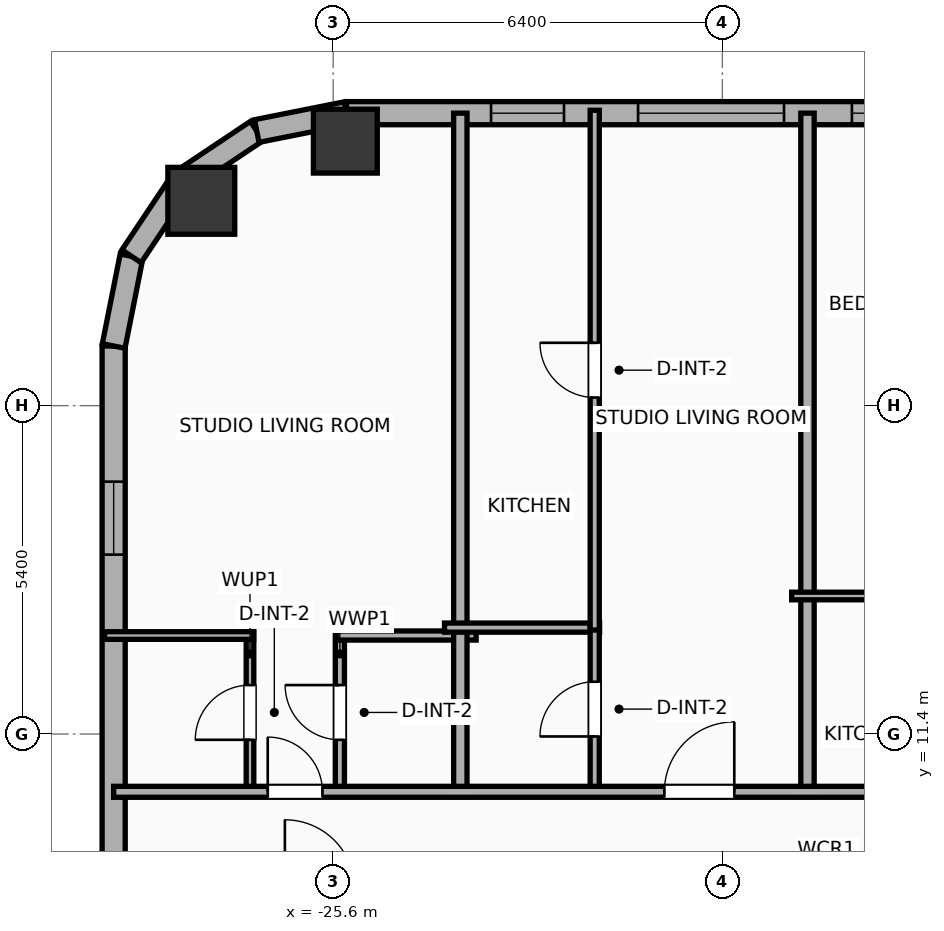
"""IFC4 building model, lengths in metres.
Left out: names, types, materials, properties, quantities, classifications, styles, units other than length and angle.
Written with IfcOpenShell. Run it as: python <this file> out.ifc"""

import sys

from ifc_helpers import new_model, si_unit, direction, frame, frame_2d, origin, origin_2d, place, context, subcontext, project, spatial, rectangle, hollow_rectangle, hollow_circle, extrude, element, fill, save


model = new_model("IFC4")
c1 = context("Model", 3, precision=1e-05, world=origin(), true_north=direction((0.0, 1.0)))
c2 = subcontext(c1, "Body", "Model", "MODEL_VIEW")
j1 = project(units=[si_unit("LENGTHUNIT", "METRE"), si_unit("PLANEANGLEUNIT", "RADIAN")], contexts=[c1])
p1 = place(None, origin())
s1 = spatial("IfcSite", under=j1, at=p1, CompositionType="ELEMENT")
p2 = place(p1, origin())
s2 = spatial("IfcBuilding", under=s1, at=p2, CompositionType="ELEMENT")
p3 = place(p2, frame((0.0, 0.0, 93.6)))
s3 = spatial("IfcBuildingStorey", under=s2, at=p3, CompositionType="ELEMENT", Elevation=93.6)
p4 = place(p3, frame((-25.4, 21.15, 0.0), z_axis=(0.0, 0.0, 1.0), x_axis=(1.0, 0.0, 0.0)))
e1 = element("IfcColumn", 1, at=p4, inside=s3, PredefinedType="COLUMN", context=c2, shape_type="SweptSolid", body=[
    extrude(hollow_rectangle(XDim=1.05, YDim=1.05, WallThickness=0.036, at=origin_2d()), origin(), (0.0, 0.0, 1.0), 3.9),
])
p5 = place(p3, frame((-27.769, 20.169, 0.0), z_axis=(0.0, 0.0, 1.0), x_axis=(1.0, 0.0, 0.0)))
e2 = element("IfcColumn", 2, at=p5, inside=s3, PredefinedType="COLUMN", context=c2, shape_type="SweptSolid", body=[
    extrude(hollow_circle(Radius=0.55, WallThickness=0.036, at=origin_2d()), origin(), (0.0, 0.0, 1.0), 3.9),
])
p6 = place(p3, frame((-29.21, -16.581, 0.0), z_axis=(0.0, 0.0, 1.0), x_axis=(0.0, 1.0, 0.0)))
e3 = element("IfcWall", 3, at=p6, inside=s3, PredefinedType="ELEMENTEDWALL", context=c2, shape_type="SweptSolid", body=[
    extrude(rectangle(XDim=34.363, YDim=0.38, at=frame_2d((17.181, 0.0))), origin(), (0.0, 0.0, 1.0), 3.65),
])
p7 = place(p6, frame((30.932, 0.0, 0.75)))
e4 = element("IfcOpeningElement", 4, at=p7, cuts=e3, PredefinedType="OPENING", context=c2, shape_type="SweptSolid", body=[
    extrude(rectangle(XDim=1.2, YDim=2.05, at=frame_2d((0.6, 1.025))), frame((0.0, 0.2, 0.0), z_axis=(0.0, -1.0, 0.0), x_axis=(1.0, 0.0, 0.0)), (0.0, 0.0, 1.0), 0.4),
])
p8 = place(p6, frame((20.501, 0.0, 0.75)))
e5 = element("IfcOpeningElement", 5, at=p8, cuts=e3, PredefinedType="OPENING", context=c2, shape_type="SweptSolid", body=[
    extrude(rectangle(XDim=1.2, YDim=2.05, at=frame_2d((0.6, 1.025))), frame((0.0, 0.2, 0.0), z_axis=(0.0, -1.0, 0.0), x_axis=(1.0, 0.0, 0.0)), (0.0, 0.0, 1.0), 0.4),
])
p9 = place(p6, frame((11.601, 0.0, 0.75)))
e6 = element("IfcOpeningElement", 6, at=p9, cuts=e3, PredefinedType="OPENING", context=c2, shape_type="SweptSolid", body=[
    extrude(rectangle(XDim=1.2, YDim=2.05, at=frame_2d((0.6, 1.025))), frame((0.0, 0.2, 0.0), z_axis=(0.0, -1.0, 0.0), x_axis=(1.0, 0.0, 0.0)), (0.0, 0.0, 1.0), 0.4),
])
p10 = place(p3, frame((-29.21, 17.781, 0.0), z_axis=(0.0, 0.0, 1.0), x_axis=(0.195086038585, 0.980786132421, 0.0)))
e7 = element("IfcWall", 7, at=p10, inside=s3, PredefinedType="ELEMENTEDWALL", context=c2, shape_type="SweptSolid", body=[
    extrude(rectangle(XDim=1.504, YDim=0.38, at=frame_2d((0.752, 0.0))), origin(), (0.0, 0.0, 1.0), 3.65),
])
p11 = place(p3, frame((-28.917, 19.257, 0.0), z_axis=(0.0, 0.0, 1.0), x_axis=(0.555610286119, 0.831442848281, 0.0)))
e8 = element("IfcWall", 8, at=p11, inside=s3, PredefinedType="ELEMENTEDWALL", context=c2, shape_type="SweptSolid", body=[
    extrude(rectangle(XDim=1.485, YDim=0.38, at=frame_2d((0.743, 0.0))), origin(), (0.0, 0.0, 1.0), 3.65),
])
p12 = place(p3, frame((-28.091, 20.491, 0.0), z_axis=(0.0, 0.0, 1.0), x_axis=(0.831468045563, 0.555572577804, 0.0)))
e9 = element("IfcWall", 9, at=p12, inside=s3, PredefinedType="ELEMENTEDWALL", context=c2, shape_type="SweptSolid", body=[
    extrude(rectangle(XDim=1.485, YDim=0.38, at=frame_2d((0.742, 0.0))), origin(), (0.0, 0.0, 1.0), 3.65),
])
p13 = place(p3, frame((-26.857, 21.316, 0.0), z_axis=(0.0, 0.0, 1.0), x_axis=(0.980755066645, 0.195242155415, 0.0)))
e10 = element("IfcWall", 10, at=p13, inside=s3, PredefinedType="ELEMENTEDWALL", context=c2, shape_type="SweptSolid", body=[
    extrude(rectangle(XDim=1.504, YDim=0.38, at=frame_2d((0.752, 0.0))), origin(), (0.0, 0.0, 1.0), 3.65),
])
p14 = place(p3, frame((-25.381, 21.61, 0.0), z_axis=(0.0, 0.0, 1.0), x_axis=(1.0, 0.0, 0.0)))
e11 = element("IfcWall", 11, at=p14, inside=s3, PredefinedType="ELEMENTEDWALL", context=c2, shape_type="SweptSolid", body=[
    extrude(rectangle(XDim=54.763, YDim=0.38, at=frame_2d((27.381, 0.0))), origin(), (0.0, 0.0, 1.0), 3.65),
])
p15 = place(p14, frame((4.795, 0.0, 0.75)))
e12 = element("IfcOpeningElement", 12, at=p15, cuts=e11, PredefinedType="OPENING", context=c2, shape_type="SweptSolid", body=[
    extrude(rectangle(XDim=2.4, YDim=2.1, at=frame_2d((1.2, 1.05))), frame((0.0, 0.2, 0.0), z_axis=(0.0, -1.0, 0.0), x_axis=(1.0, 0.0, 0.0)), (0.0, 0.0, 1.0), 0.4),
])
p16 = place(p14, frame((2.377, 0.0, 0.75)))
e13 = element("IfcOpeningElement", 13, at=p16, cuts=e11, PredefinedType="OPENING", context=c2, shape_type="SweptSolid", body=[
    extrude(rectangle(XDim=1.2, YDim=2.05, at=frame_2d((0.6, 1.025))), frame((0.0, 0.2, 0.0), z_axis=(0.0, -1.0, 0.0), x_axis=(1.0, 0.0, 0.0)), (0.0, 0.0, 1.0), 0.4),
])
p17 = place(p14, frame((11.707, 0.0, 0.75)))
e14 = element("IfcOpeningElement", 14, at=p17, cuts=e11, PredefinedType="OPENING", context=c2, shape_type="SweptSolid", body=[
    extrude(rectangle(XDim=1.2, YDim=2.05, at=frame_2d((0.6, 1.025))), frame((0.0, 0.2, 0.0), z_axis=(0.0, -1.0, 0.0), x_axis=(1.0, 0.0, 0.0)), (0.0, 0.0, 1.0), 0.4),
])
p18 = place(p14, frame((8.312, 0.0, 0.75)))
e15 = element("IfcOpeningElement", 15, at=p18, cuts=e11, PredefinedType="OPENING", context=c2, shape_type="SweptSolid", body=[
    extrude(rectangle(XDim=1.2, YDim=2.05, at=frame_2d((0.6, 1.025))), frame((0.0, 0.2, 0.0), z_axis=(0.0, -1.0, 0.0), x_axis=(1.0, 0.0, 0.0)), (0.0, 0.0, 1.0), 0.4),
])
p19 = place(p14, frame((15.476, 0.0, 0.75)))
e16 = element("IfcOpeningElement", 16, at=p19, cuts=e11, PredefinedType="OPENING", context=c2, shape_type="SweptSolid", body=[
    extrude(rectangle(XDim=1.2, YDim=2.05, at=frame_2d((0.6, 1.025))), frame((0.0, 0.2, 0.0), z_axis=(0.0, -1.0, 0.0), x_axis=(1.0, 0.0, 0.0)), (0.0, 0.0, 1.0), 0.4),
])
p20 = place(p14, frame((22.628, 0.0, 0.75)))
e17 = element("IfcOpeningElement", 17, at=p20, cuts=e11, PredefinedType="OPENING", context=c2, shape_type="SweptSolid", body=[
    extrude(rectangle(XDim=1.2, YDim=2.05, at=frame_2d((0.6, 1.025))), frame((0.0, 0.2, 0.0), z_axis=(0.0, -1.0, 0.0), x_axis=(1.0, 0.0, 0.0)), (0.0, 0.0, 1.0), 0.4),
])
p21 = place(p14, frame((18.633, 0.0, 0.75)))
e18 = element("IfcOpeningElement", 18, at=p21, cuts=e11, PredefinedType="OPENING", context=c2, shape_type="SweptSolid", body=[
    extrude(rectangle(XDim=1.2, YDim=2.05, at=frame_2d((0.6, 1.025))), frame((0.0, 0.2, 0.0), z_axis=(0.0, -1.0, 0.0), x_axis=(1.0, 0.0, 0.0)), (0.0, 0.0, 1.0), 0.4),
])
p22 = place(p14, frame((25.676, 0.0, 0.75)))
e19 = element("IfcOpeningElement", 19, at=p22, cuts=e11, PredefinedType="OPENING", context=c2, shape_type="SweptSolid", body=[
    extrude(rectangle(XDim=1.2, YDim=2.05, at=frame_2d((0.6, 1.025))), frame((0.0, 0.2, 0.0), z_axis=(0.0, -1.0, 0.0), x_axis=(1.0, 0.0, 0.0)), (0.0, 0.0, 1.0), 0.4),
])
p23 = place(p14, frame((30.881, 0.0, 0.75)))
e20 = element("IfcOpeningElement", 20, at=p23, cuts=e11, PredefinedType="OPENING", context=c2, shape_type="SweptSolid", body=[
    extrude(rectangle(XDim=1.2, YDim=2.05, at=frame_2d((0.6, 1.025))), frame((0.0, 0.2, 0.0), z_axis=(0.0, -1.0, 0.0), x_axis=(1.0, 0.0, 0.0)), (0.0, 0.0, 1.0), 0.4),
])
p24 = place(p14, frame((28.686, 0.0, 0.75)))
e21 = element("IfcOpeningElement", 21, at=p24, cuts=e11, PredefinedType="OPENING", context=c2, shape_type="SweptSolid", body=[
    extrude(rectangle(XDim=1.2, YDim=2.05, at=frame_2d((0.6, 1.025))), frame((0.0, 0.2, 0.0), z_axis=(0.0, -1.0, 0.0), x_axis=(1.0, 0.0, 0.0)), (0.0, 0.0, 1.0), 0.4),
])
p25 = place(p14, frame((35.876, 0.0, 0.75)))
e22 = element("IfcOpeningElement", 22, at=p25, cuts=e11, PredefinedType="OPENING", context=c2, shape_type="SweptSolid", body=[
    extrude(rectangle(XDim=1.2, YDim=2.05, at=frame_2d((0.6, 1.025))), frame((0.0, 0.2, 0.0), z_axis=(0.0, -1.0, 0.0), x_axis=(1.0, 0.0, 0.0)), (0.0, 0.0, 1.0), 0.4),
])
p26 = place(p14, frame((40.976, 0.0, 0.75)))
e23 = element("IfcOpeningElement", 23, at=p26, cuts=e11, PredefinedType="OPENING", context=c2, shape_type="SweptSolid", body=[
    extrude(rectangle(XDim=1.2, YDim=2.05, at=frame_2d((0.6, 1.025))), frame((0.0, 0.2, 0.0), z_axis=(0.0, -1.0, 0.0), x_axis=(1.0, 0.0, 0.0)), (0.0, 0.0, 1.0), 0.4),
])
p27 = place(p14, frame((46.076, 0.0, 0.75)))
e24 = element("IfcOpeningElement", 24, at=p27, cuts=e11, PredefinedType="OPENING", context=c2, shape_type="SweptSolid", body=[
    extrude(rectangle(XDim=1.2, YDim=2.05, at=frame_2d((0.6, 1.025))), frame((0.0, 0.2, 0.0), z_axis=(0.0, -1.0, 0.0), x_axis=(1.0, 0.0, 0.0)), (0.0, 0.0, 1.0), 0.4),
])
p28 = place(p14, frame((50.527, 0.0, 0.75)))
e25 = element("IfcOpeningElement", 25, at=p28, cuts=e11, PredefinedType="OPENING", context=c2, shape_type="SweptSolid", body=[
    extrude(rectangle(XDim=1.2, YDim=2.05, at=frame_2d((0.6, 1.025))), frame((0.0, 0.2, 0.0), z_axis=(0.0, -1.0, 0.0), x_axis=(1.0, 0.0, 0.0)), (0.0, 0.0, 1.0), 0.4),
])
p29 = place(p3, frame((-26.968, 10.43, 0.0), z_axis=(0.0, 0.0, 1.0), x_axis=(0.0, 1.0, 0.0)))
e26 = element("IfcWall", 26, at=p29, inside=s3, PredefinedType="PARTITIONING", context=c2, shape_type="SweptSolid", body=[
    extrude(rectangle(XDim=2.65, YDim=0.125, at=frame_2d((1.325, 0.0))), origin(), (0.0, 0.0, 1.0), 3.65),
])
p30 = place(p29, frame((0.875, 0.0, 0.0)))
e27 = element("IfcOpeningElement", 27, at=p30, cuts=e26, PredefinedType="OPENING", context=c2, shape_type="SweptSolid", body=[
    extrude(rectangle(XDim=0.9, YDim=2.05, at=frame_2d((0.45, 1.025))), frame((0.0, 0.073, 0.0), z_axis=(0.0, -1.0, 0.0), x_axis=(1.0, 0.0, 0.0)), (0.0, 0.0, 1.0), 0.145),
])
p31 = place(p3, frame((-25.49, 10.43, 0.0), z_axis=(0.0, 0.0, 1.0), x_axis=(0.0, 1.0, 0.0)))
e28 = element("IfcWall", 28, at=p31, inside=s3, PredefinedType="PLUMBINGWALL", context=c2, shape_type="SweptSolid", body=[
    extrude(rectangle(XDim=2.65, YDim=0.15, at=frame_2d((1.325, 0.0))), origin(), (0.0, 0.0, 1.0), 3.65),
])
p32 = place(p31, frame((0.875, 0.0, 0.0)))
e29 = element("IfcOpeningElement", 29, at=p32, cuts=e28, PredefinedType="OPENING", context=c2, shape_type="SweptSolid", body=[
    extrude(rectangle(XDim=0.9, YDim=2.05, at=frame_2d((0.45, 1.025))), frame((0.0, 0.085, 0.0), z_axis=(0.0, -1.0, 0.0), x_axis=(1.0, 0.0, 0.0)), (0.0, 0.0, 1.0), 0.17),
])
p33 = place(p3, frame((-29.36, 13.02, 0.0), z_axis=(0.0, 0.0, 1.0), x_axis=(1.0, 0.0, 0.0)))
e30 = element("IfcWall", 30, at=p33, inside=s3, PredefinedType="PARTITIONING", context=c2, shape_type="SweptSolid", body=[
    extrude(rectangle(XDim=2.452, YDim=0.125, at=frame_2d((1.226, 0.0))), origin(), (0.0, 0.0, 1.0), 3.65),
])
p34 = place(p3, frame((-25.55, 13.02, 0.0), z_axis=(0.0, 0.0, 1.0), x_axis=(1.0, 0.0, 0.0)))
e31 = element("IfcWall", 31, at=p34, inside=s3, PredefinedType="PLUMBINGWALL", context=c2, shape_type="SweptSolid", body=[
    extrude(rectangle(XDim=2.301, YDim=0.15, at=frame_2d((1.15, 0.0))), origin(), (0.0, 0.0, 1.0), 3.65),
])
p35 = place(p3, frame((-23.509, 10.37, 0.0), z_axis=(0.0, 0.0, 1.0), x_axis=(0.0, 1.0, 0.0)))
e32 = element("IfcWall", 32, at=p35, inside=s3, PredefinedType="PARTITIONING", context=c2, shape_type="SweptSolid", body=[
    extrude(rectangle(XDim=11.24, YDim=0.22, at=frame_2d((5.62, 0.0))), origin(), (0.0, 0.0, 1.0), 3.65),
])
p36 = place(p3, frame((-23.769, 13.15, 0.0), z_axis=(0.0, 0.0, 1.0), x_axis=(1.0, 0.0, 0.0)))
e33 = element("IfcWall", 33, at=p36, inside=s3, PredefinedType="PLUMBINGWALL", context=c2, shape_type="SweptSolid", body=[
    extrude(rectangle(XDim=2.55, YDim=0.15, at=frame_2d((1.275, 0.0))), origin(), (0.0, 0.0, 1.0), 3.65),
])
p37 = place(p3, frame((-21.299, 10.43, 0.0), z_axis=(0.0, 0.0, 1.0), x_axis=(0.0, 1.0, 0.0)))
e34 = element("IfcWall", 34, at=p37, inside=s3, PredefinedType="PLUMBINGWALL", context=c2, shape_type="SweptSolid", body=[
    extrude(rectangle(XDim=2.76, YDim=0.15, at=frame_2d((1.38, 0.0))), origin(), (0.0, 0.0, 1.0), 3.65),
])
p38 = place(p37, frame((0.93, 0.0, 0.0)))
e35 = element("IfcOpeningElement", 35, at=p38, cuts=e34, PredefinedType="OPENING", context=c2, shape_type="SweptSolid", body=[
    extrude(rectangle(XDim=0.9, YDim=2.05, at=frame_2d((0.45, 1.025))), frame((0.0, 0.085, 0.0), z_axis=(0.0, -1.0, 0.0), x_axis=(1.0, 0.0, 0.0)), (0.0, 0.0, 1.0), 0.17),
])
p39 = place(p3, frame((-21.299, 13.11, 0.0), z_axis=(0.0, 0.0, 1.0), x_axis=(0.0, 1.0, 0.0)))
e36 = element("IfcWall", 36, at=p39, inside=s3, PredefinedType="PLUMBINGWALL", context=c2, shape_type="SweptSolid", body=[
    extrude(rectangle(XDim=8.548, YDim=0.15, at=frame_2d((4.274, 0.0))), origin(), (0.0, 0.0, 1.0), 3.65),
])
p40 = place(p39, frame((3.824, 0.0, 0.0)))
e37 = element("IfcOpeningElement", 37, at=p40, cuts=e36, PredefinedType="OPENING", context=c2, shape_type="SweptSolid", body=[
    extrude(rectangle(XDim=0.9, YDim=2.05, at=frame_2d((0.45, 1.025))), frame((0.0, 0.085, 0.0), z_axis=(0.0, -1.0, 0.0), x_axis=(1.0, 0.0, 0.0)), (0.0, 0.0, 1.0), 0.17),
])
p41 = place(p3, frame((-17.8, 10.37, 0.0), z_axis=(0.0, 0.0, 1.0), x_axis=(0.0, 1.0, 0.0)))
e38 = element("IfcWall", 38, at=p41, inside=s3, PredefinedType="PARTITIONING", context=c2, shape_type="SweptSolid", body=[
    extrude(rectangle(XDim=11.24, YDim=0.22, at=frame_2d((5.62, 0.0))), origin(), (0.0, 0.0, 1.0), 3.65),
])
p42 = place(p3, frame((-18.06, 13.67, 0.0), z_axis=(0.0, 0.0, 1.0), x_axis=(1.0, 0.0, 0.0)))
e39 = element("IfcWall", 39, at=p42, inside=s3, PredefinedType="PARTITIONING", context=c2, shape_type="SweptSolid", body=[
    extrude(rectangle(XDim=3.101, YDim=0.125, at=frame_2d((1.551, 0.0))), origin(), (0.0, 0.0, 1.0), 3.65),
])
p43 = place(p3, frame((-29.21, 10.45, 0.0), z_axis=(0.0, 0.0, 1.0), x_axis=(1.0, 0.0, 0.0)))
e40 = element("IfcWall", 40, at=p43, inside=s3, PredefinedType="PARTITIONING", context=c2, shape_type="SweptSolid", body=[
    extrude(rectangle(XDim=62.42, YDim=0.18, at=frame_2d((31.21, 0.0))), origin(), (0.0, 0.0, 1.0), 3.65),
])
p44 = place(p43, frame((2.534, 0.0, 0.0)))
e41 = element("IfcOpeningElement", 41, at=p44, cuts=e40, PredefinedType="OPENING", context=c2, shape_type="SweptSolid", body=[
    extrude(rectangle(XDim=0.9, YDim=2.05, at=frame_2d((0.45, 1.025))), frame((0.0, 0.1, 0.0), z_axis=(0.0, -1.0, 0.0), x_axis=(1.0, 0.0, 0.0)), (0.0, 0.0, 1.0), 0.2),
])
p45 = place(p43, frame((9.056, 0.0, 0.0)))
e42 = element("IfcOpeningElement", 42, at=p45, cuts=e40, PredefinedType="OPENING", context=c2, shape_type="SweptSolid", body=[
    extrude(rectangle(XDim=1.15, YDim=2.05, at=frame_2d((0.575, 1.025))), frame((0.0, 0.1, 0.0), z_axis=(0.0, -1.0, 0.0), x_axis=(1.0, 0.0, 0.0)), (0.0, 0.0, 1.0), 0.2),
])
p46 = place(p43, frame((16.303, 0.0, 0.0)))
e43 = element("IfcOpeningElement", 43, at=p46, cuts=e40, PredefinedType="OPENING", context=c2, shape_type="SweptSolid", body=[
    extrude(rectangle(XDim=1.15, YDim=2.05, at=frame_2d((0.575, 1.025))), frame((0.0, 0.1, 0.0), z_axis=(0.0, -1.0, 0.0), x_axis=(1.0, 0.0, 0.0)), (0.0, 0.0, 1.0), 0.2),
])
p47 = place(p43, frame((26.565, 0.0, 0.0)))
e44 = element("IfcOpeningElement", 44, at=p47, cuts=e40, PredefinedType="OPENING", context=c2, shape_type="SweptSolid", body=[
    extrude(rectangle(XDim=1.15, YDim=2.05, at=frame_2d((0.575, 1.025))), frame((0.0, 0.1, 0.0), z_axis=(0.0, -1.0, 0.0), x_axis=(1.0, 0.0, 0.0)), (0.0, 0.0, 1.0), 0.2),
])
p48 = place(p43, frame((36.677, 0.0, 0.0)))
e45 = element("IfcOpeningElement", 45, at=p48, cuts=e40, PredefinedType="OPENING", context=c2, shape_type="SweptSolid", body=[
    extrude(rectangle(XDim=1.15, YDim=2.05, at=frame_2d((0.575, 1.025))), frame((0.0, 0.1, 0.0), z_axis=(0.0, -1.0, 0.0), x_axis=(1.0, 0.0, 0.0)), (0.0, 0.0, 1.0), 0.2),
])
p49 = place(p43, frame((46.939, 0.0, 0.0)))
e46 = element("IfcOpeningElement", 46, at=p49, cuts=e40, PredefinedType="OPENING", context=c2, shape_type="SweptSolid", body=[
    extrude(rectangle(XDim=1.15, YDim=2.05, at=frame_2d((0.575, 1.025))), frame((0.0, 0.1, 0.0), z_axis=(0.0, -1.0, 0.0), x_axis=(1.0, 0.0, 0.0)), (0.0, 0.0, 1.0), 0.2),
])
p50 = place(p43, frame((57.245, 0.0, 0.0)))
e47 = element("IfcOpeningElement", 47, at=p50, cuts=e40, PredefinedType="OPENING", context=c2, shape_type="SweptSolid", body=[
    extrude(rectangle(XDim=1.15, YDim=2.05, at=frame_2d((0.575, 1.025))), frame((0.0, 0.1, 0.0), z_axis=(0.0, -1.0, 0.0), x_axis=(1.0, 0.0, 0.0)), (0.0, 0.0, 1.0), 0.2),
])
p51 = place(p15, origin())
e48 = element("IfcWindow", 48, at=p51, inside=s3, PartitioningType="SINGLE_PANEL", PredefinedType="WINDOW", context=c2, shape_type="SweptSolid", body=[
    extrude(rectangle(XDim=2.4, YDim=2.1, at=frame_2d((1.2, 1.05))), frame((0.0, 0.03, 0.0), z_axis=(0.0, -1.0, 0.0), x_axis=(1.0, 0.0, 0.0)), (0.0, 0.0, 1.0), 0.06),
])
fill(e12, e48)
p52 = place(p7, origin())
e49 = element("IfcWindow", 49, at=p52, inside=s3, PartitioningType="SINGLE_PANEL", PredefinedType="WINDOW", context=c2, shape_type="SweptSolid", body=[
    extrude(rectangle(XDim=1.2, YDim=2.05, at=frame_2d((0.6, 1.025))), frame((0.0, 0.03, 0.0), z_axis=(0.0, -1.0, 0.0), x_axis=(1.0, 0.0, 0.0)), (0.0, 0.0, 1.0), 0.06),
])
fill(e4, e49)
p53 = place(p16, origin())
e50 = element("IfcWindow", 50, at=p53, inside=s3, PartitioningType="SINGLE_PANEL", PredefinedType="WINDOW", context=c2, shape_type="SweptSolid", body=[
    extrude(rectangle(XDim=1.2, YDim=2.05, at=frame_2d((0.6, 1.025))), frame((0.0, 0.03, 0.0), z_axis=(0.0, -1.0, 0.0), x_axis=(1.0, 0.0, 0.0)), (0.0, 0.0, 1.0), 0.06),
])
fill(e13, e50)
p54 = place(p18, origin())
e51 = element("IfcWindow", 51, at=p54, inside=s3, PartitioningType="SINGLE_PANEL", PredefinedType="WINDOW", context=c2, shape_type="SweptSolid", body=[
    extrude(rectangle(XDim=1.2, YDim=2.05, at=frame_2d((0.6, 1.025))), frame((0.0, 0.03, 0.0), z_axis=(0.0, -1.0, 0.0), x_axis=(1.0, 0.0, 0.0)), (0.0, 0.0, 1.0), 0.06),
])
fill(e15, e51)
p55 = place(p30, origin())
e52 = element("IfcDoor", 52, at=p55, inside=s3, OperationType="SINGLE_SWING_LEFT", PredefinedType="DOOR", context=c2, shape_type="SweptSolid", body=[
    extrude(rectangle(XDim=0.9, YDim=2.05, at=frame_2d((0.45, 1.025))), frame((0.0, 0.025, 0.0), z_axis=(0.0, -1.0, 0.0), x_axis=(1.0, 0.0, 0.0)), (0.0, 0.0, 1.0), 0.05),
])
fill(e27, e52)
p56 = place(p32, origin())
e53 = element("IfcDoor", 53, at=p56, inside=s3, OperationType="SINGLE_SWING_RIGHT", PredefinedType="DOOR", context=c2, shape_type="SweptSolid", body=[
    extrude(rectangle(XDim=0.9, YDim=2.05, at=frame_2d((0.45, 1.025))), frame((0.0, 0.025, 0.0), z_axis=(0.0, -1.0, 0.0), x_axis=(1.0, 0.0, 0.0)), (0.0, 0.0, 1.0), 0.05),
])
fill(e29, e53)
p57 = place(p38, origin())
e54 = element("IfcDoor", 54, at=p57, inside=s3, OperationType="SINGLE_SWING_LEFT", PredefinedType="DOOR", context=c2, shape_type="SweptSolid", body=[
    extrude(rectangle(XDim=0.9, YDim=2.05, at=frame_2d((0.45, 1.025))), frame((0.0, 0.025, 0.0), z_axis=(0.0, -1.0, 0.0), x_axis=(1.0, 0.0, 0.0)), (0.0, 0.0, 1.0), 0.05),
])
fill(e35, e54)
p58 = place(p40, origin())
e55 = element("IfcDoor", 55, at=p58, inside=s3, OperationType="SINGLE_SWING_RIGHT", PredefinedType="DOOR", context=c2, shape_type="SweptSolid", body=[
    extrude(rectangle(XDim=0.9, YDim=2.05, at=frame_2d((0.45, 1.025))), frame((0.0, 0.025, 0.0), z_axis=(0.0, -1.0, 0.0), x_axis=(1.0, 0.0, 0.0)), (0.0, 0.0, 1.0), 0.05),
])
fill(e37, e55)
p59 = place(p44, origin())
e56 = element("IfcDoor", 56, at=p59, inside=s3, OperationType="SINGLE_SWING_LEFT", PredefinedType="DOOR", context=c2, shape_type="SweptSolid", body=[
    extrude(rectangle(XDim=0.9, YDim=2.05, at=frame_2d((0.45, 1.025))), frame((0.0, 0.025, 0.0), z_axis=(0.0, -1.0, 0.0), x_axis=(1.0, 0.0, 0.0)), (0.0, 0.0, 1.0), 0.05),
])
fill(e41, e56)
p60 = place(p45, origin())
e57 = element("IfcDoor", 57, at=p60, inside=s3, OperationType="SINGLE_SWING_RIGHT", PredefinedType="DOOR", context=c2, shape_type="SweptSolid", body=[
    extrude(rectangle(XDim=1.15, YDim=2.05, at=frame_2d((0.575, 1.025))), frame((0.0, 0.025, 0.0), z_axis=(0.0, -1.0, 0.0), x_axis=(1.0, 0.0, 0.0)), (0.0, 0.0, 1.0), 0.05),
])
fill(e42, e57)
save(model, sys.argv[1])
